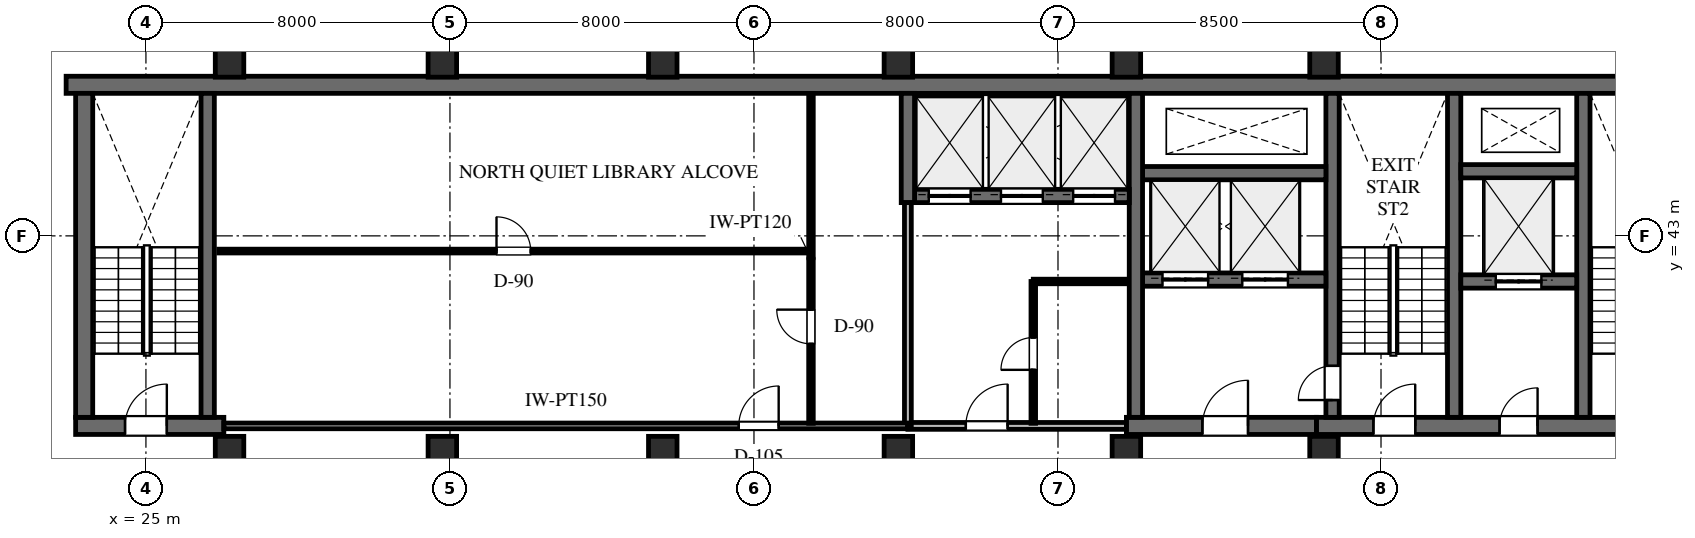
"""IFC4 building model, lengths in metres.
Left out: names, types, materials, properties, quantities, classifications, styles, units other than length and angle.
Written with IfcOpenShell. Run it as: python <this file> out.ifc"""

import sys

from ifc_helpers import new_model, si_unit, direction, frame, frame_2d, origin, origin_2d, place, context, subcontext, project, spatial, rectangle, extrude, element, fill, save


model = new_model("IFC4")
c1 = context("Model", 3, precision=1e-05, world=origin(), true_north=direction((0.0, 1.0)))
c2 = subcontext(c1, "Body", "Model", "MODEL_VIEW")
j1 = project(units=[si_unit("LENGTHUNIT", "METRE"), si_unit("PLANEANGLEUNIT", "RADIAN")], contexts=[c1])
p1 = place(None, origin())
s1 = spatial("IfcSite", under=j1, at=p1, CompositionType="ELEMENT")
p2 = place(p1, origin())
s2 = spatial("IfcBuilding", under=s1, at=p2, CompositionType="ELEMENT")
p3 = place(p2, frame((0.0, 0.0, 234.6)))
s3 = spatial("IfcBuildingStorey", under=s2, at=p3, CompositionType="ELEMENT", Elevation=234.6)
p4 = place(p3, frame((22.9, 46.975, 0.0), z_axis=(0.0, 0.0, 1.0), x_axis=(1.0, 0.0, 0.0)))
e1 = element("IfcWall", 1, at=p4, inside=s3, PredefinedType="SHEAR", context=c2, shape_type="SweptSolid", body=[
    extrude(rectangle(XDim=43.4, YDim=0.45, at=frame_2d((21.7, 0.0))), origin(), (0.0, 0.0, 1.0), 3.6),
])
p5 = place(p3, frame((55.8, 38.0, 0.0), z_axis=(0.0, 0.0, 1.0), x_axis=(1.0, 0.0, 0.0)))
e2 = element("IfcWall", 2, at=p5, inside=s3, PredefinedType="SHEAR", context=c2, shape_type="SweptSolid", body=[
    extrude(rectangle(XDim=10.5, YDim=0.45, at=frame_2d((5.25, 0.0))), origin(), (0.0, 0.0, 1.0), 3.6),
])
p6 = place(p5, frame((1.5, 0.0, 0.0)))
e3 = element("IfcOpeningElement", 3, at=p6, cuts=e2, PredefinedType="OPENING", context=c2, shape_type="SweptSolid", body=[
    extrude(rectangle(XDim=1.1, YDim=2.2, at=frame_2d((0.55, 1.1))), frame((0.0, 0.235, 0.0), z_axis=(0.0, -1.0, 0.0), x_axis=(1.0, 0.0, 0.0)), (0.0, 0.0, 1.0), 0.47),
])
p7 = place(p5, frame((4.82, 0.0, 0.0)))
e4 = element("IfcOpeningElement", 4, at=p7, cuts=e2, PredefinedType="OPENING", context=c2, shape_type="SweptSolid", body=[
    extrude(rectangle(XDim=1.0, YDim=2.15, at=frame_2d((0.5, 1.075))), frame((0.0, 0.235, 0.0), z_axis=(0.0, -1.0, 0.0), x_axis=(1.0, 0.0, 0.0)), (0.0, 0.0, 1.0), 0.47),
])
p8 = place(p5, frame((8.05, 0.0, 0.0)))
e5 = element("IfcOpeningElement", 5, at=p8, cuts=e2, PredefinedType="OPENING", context=c2, shape_type="SweptSolid", body=[
    extrude(rectangle(XDim=1.1, YDim=2.2, at=frame_2d((0.55, 1.1))), frame((0.0, 0.235, 0.0), z_axis=(0.0, -1.0, 0.0), x_axis=(1.0, 0.0, 0.0)), (0.0, 0.0, 1.0), 0.47),
])
for number, where, z_axis, x_axis in (
    (6, (62.825, 38.225, 0.0), (0.0, 0.0, 1.0), (0.0, 1.0, 0.0)),
    (7, (59.425, 38.225, 0.0), (0.0, 0.0, 1.0), (0.0, 1.0, 0.0)),
):
    element("IfcWall", number, at=place(p3, frame(where, z_axis=z_axis, x_axis=x_axis)), inside=s3, PredefinedType="SHEAR", context=c2, shape_type="SweptSolid", body=[
        extrude(rectangle(XDim=8.525, YDim=0.35, at=frame_2d((4.262, 0.0))), origin(), (0.0, 0.0, 1.0), 3.6),
    ])
p9 = place(p3, frame((56.225, 38.225, 0.0), z_axis=(0.0, 0.0, 1.0), x_axis=(0.0, 1.0, 0.0)))
e8 = element("IfcWall", 8, at=p9, inside=s3, PredefinedType="SHEAR", context=c2, shape_type="SweptSolid", body=[
    extrude(rectangle(XDim=8.525, YDim=0.35, at=frame_2d((4.262, 0.0))), origin(), (0.0, 0.0, 1.0), 3.6),
])
p10 = place(p9, frame((0.455, 0.0, 0.0)))
e9 = element("IfcOpeningElement", 9, at=p10, cuts=e8, PredefinedType="OPENING", context=c2, shape_type="SweptSolid", body=[
    extrude(rectangle(XDim=0.9, YDim=2.15, at=frame_2d((0.45, 1.075))), frame((0.0, 0.185, 0.0), z_axis=(0.0, -1.0, 0.0), x_axis=(1.0, 0.0, 0.0)), (0.0, 0.0, 1.0), 0.37),
])
p11 = place(p3, frame((59.6, 41.8, 0.0), z_axis=(0.0, 0.0, 1.0), x_axis=(1.0, 0.0, 0.0)))
e10 = element("IfcWall", 10, at=p11, inside=s3, PredefinedType="SHEAR", context=c2, shape_type="SweptSolid", body=[
    extrude(rectangle(XDim=3.05, YDim=0.35, at=frame_2d((1.525, 0.0))), origin(), (0.0, 0.0, 1.0), 3.6),
])
p12 = place(p11, frame((0.92, 0.0, 0.0)))
e11 = element("IfcOpeningElement", 11, at=p12, cuts=e10, PredefinedType="OPENING", context=c2, shape_type="SweptSolid", body=[
    extrude(rectangle(XDim=1.2, YDim=2.2, at=frame_2d((0.6, 1.1))), frame((0.0, 0.185, 0.0), z_axis=(0.0, -1.0, 0.0), x_axis=(1.0, 0.0, 0.0)), (0.0, 0.0, 1.0), 0.37),
])
p13 = place(p3, frame((59.6, 44.7, 0.0), z_axis=(0.0, 0.0, 1.0), x_axis=(1.0, 0.0, 0.0)))
e12 = element("IfcWall", 12, at=p13, inside=s3, PredefinedType="SHEAR", context=c2, shape_type="SweptSolid", body=[
    extrude(rectangle(XDim=3.05, YDim=0.35, at=frame_2d((1.525, 0.0))), origin(), (0.0, 0.0, 1.0), 3.6),
])
p14 = place(p3, frame((50.8, 38.0, 0.0), z_axis=(0.0, 0.0, 1.0), x_axis=(1.0, 0.0, 0.0)))
e13 = element("IfcWall", 13, at=p14, inside=s3, PredefinedType="SHEAR", context=c2, shape_type="SweptSolid", body=[
    extrude(rectangle(XDim=5.0, YDim=0.45, at=frame_2d((2.5, 0.0))), origin(), (0.0, 0.0, 1.0), 3.6),
])
p15 = place(p14, frame((2.0, 0.0, 0.0)))
e14 = element("IfcOpeningElement", 14, at=p15, cuts=e13, PredefinedType="OPENING", context=c2, shape_type="SweptSolid", body=[
    extrude(rectangle(XDim=1.2, YDim=2.2, at=frame_2d((0.6, 1.1))), frame((0.0, 0.235, 0.0), z_axis=(0.0, -1.0, 0.0), x_axis=(1.0, 0.0, 0.0)), (0.0, 0.0, 1.0), 0.47),
])
p16 = place(p3, frame((51.225, 41.85, 0.0), z_axis=(0.0, 0.0, 1.0), x_axis=(1.0, 0.0, 0.0)))
e15 = element("IfcWall", 15, at=p16, inside=s3, PredefinedType="SHEAR", context=c2, shape_type="SweptSolid", body=[
    extrude(rectangle(XDim=4.825, YDim=0.35, at=frame_2d((2.413, 0.0))), origin(), (0.0, 0.0, 1.0), 3.6),
])
p17 = place(p16, frame((0.525, 0.0, 0.0)))
e16 = element("IfcOpeningElement", 16, at=p17, cuts=e15, PredefinedType="OPENING", context=c2, shape_type="SweptSolid", body=[
    extrude(rectangle(XDim=1.2, YDim=2.2, at=frame_2d((0.6, 1.1))), frame((0.0, 0.185, 0.0), z_axis=(0.0, -1.0, 0.0), x_axis=(1.0, 0.0, 0.0)), (0.0, 0.0, 1.0), 0.37),
])
p18 = place(p16, frame((2.625, 0.0, 0.0)))
e17 = element("IfcOpeningElement", 17, at=p18, cuts=e15, PredefinedType="OPENING", context=c2, shape_type="SweptSolid", body=[
    extrude(rectangle(XDim=1.2, YDim=2.2, at=frame_2d((0.6, 1.1))), frame((0.0, 0.185, 0.0), z_axis=(0.0, -1.0, 0.0), x_axis=(1.0, 0.0, 0.0)), (0.0, 0.0, 1.0), 0.37),
])
p19 = place(p3, frame((51.225, 44.65, 0.0), z_axis=(0.0, 0.0, 1.0), x_axis=(1.0, 0.0, 0.0)))
e18 = element("IfcWall", 18, at=p19, inside=s3, PredefinedType="SHEAR", context=c2, shape_type="SweptSolid", body=[
    extrude(rectangle(XDim=4.825, YDim=0.35, at=frame_2d((2.413, 0.0))), origin(), (0.0, 0.0, 1.0), 3.6),
])
p20 = place(p3, frame((51.05, 38.225, 0.0), z_axis=(0.0, 0.0, 1.0), x_axis=(0.0, 1.0, 0.0)))
e19 = element("IfcWall", 19, at=p20, inside=s3, PredefinedType="SHEAR", context=c2, shape_type="SweptSolid", body=[
    extrude(rectangle(XDim=8.525, YDim=0.35, at=frame_2d((4.262, 0.0))), origin(), (0.0, 0.0, 1.0), 3.6),
])
p21 = place(p3, frame((45.225, 44.05, 0.0), z_axis=(0.0, 0.0, 1.0), x_axis=(1.0, 0.0, 0.0)))
e20 = element("IfcWall", 20, at=p21, inside=s3, PredefinedType="SHEAR", context=c2, shape_type="SweptSolid", body=[
    extrude(rectangle(XDim=5.65, YDim=0.35, at=frame_2d((2.825, 0.0))), origin(), (0.0, 0.0, 1.0), 3.6),
])
p22 = place(p21, frame((0.375, 0.0, 0.0)))
e21 = element("IfcOpeningElement", 21, at=p22, cuts=e20, PredefinedType="OPENING", context=c2, shape_type="SweptSolid", body=[
    extrude(rectangle(XDim=1.1, YDim=2.2, at=frame_2d((0.55, 1.1))), frame((0.0, 0.185, 0.0), z_axis=(0.0, -1.0, 0.0), x_axis=(1.0, 0.0, 0.0)), (0.0, 0.0, 1.0), 0.37),
])
p23 = place(p21, frame((2.275, 0.0, 0.0)))
e22 = element("IfcOpeningElement", 22, at=p23, cuts=e20, PredefinedType="OPENING", context=c2, shape_type="SweptSolid", body=[
    extrude(rectangle(XDim=1.1, YDim=2.2, at=frame_2d((0.55, 1.1))), frame((0.0, 0.185, 0.0), z_axis=(0.0, -1.0, 0.0), x_axis=(1.0, 0.0, 0.0)), (0.0, 0.0, 1.0), 0.37),
])
p24 = place(p21, frame((4.175, 0.0, 0.0)))
e23 = element("IfcOpeningElement", 23, at=p24, cuts=e20, PredefinedType="OPENING", context=c2, shape_type="SweptSolid", body=[
    extrude(rectangle(XDim=1.1, YDim=2.2, at=frame_2d((0.55, 1.1))), frame((0.0, 0.185, 0.0), z_axis=(0.0, -1.0, 0.0), x_axis=(1.0, 0.0, 0.0)), (0.0, 0.0, 1.0), 0.37),
])
p25 = place(p3, frame((45.05, 43.875, 0.0), z_axis=(0.0, 0.0, 1.0), x_axis=(0.0, 1.0, 0.0)))
e24 = element("IfcWall", 24, at=p25, inside=s3, PredefinedType="SHEAR", context=c2, shape_type="SweptSolid", body=[
    extrude(rectangle(XDim=2.875, YDim=0.35, at=frame_2d((1.438, 0.0))), origin(), (0.0, 0.0, 1.0), 3.6),
])
p26 = place(p3, frame((23.15, 38.0, 0.0), z_axis=(0.0, 0.0, 1.0), x_axis=(1.0, 0.0, 0.0)))
e25 = element("IfcWall", 25, at=p26, inside=s3, PredefinedType="SHEAR", context=c2, shape_type="SweptSolid", body=[
    extrude(rectangle(XDim=3.9, YDim=0.45, at=frame_2d((1.95, 0.0))), origin(), (0.0, 0.0, 1.0), 3.6),
])
p27 = place(p26, frame((1.3, 0.0, 0.0)))
e26 = element("IfcOpeningElement", 26, at=p27, cuts=e25, PredefinedType="OPENING", context=c2, shape_type="SweptSolid", body=[
    extrude(rectangle(XDim=1.1, YDim=2.2, at=frame_2d((0.55, 1.1))), frame((0.0, 0.235, 0.0), z_axis=(0.0, -1.0, 0.0), x_axis=(1.0, 0.0, 0.0)), (0.0, 0.0, 1.0), 0.47),
])
p28 = place(p3, frame((23.375, 38.225, 0.0), z_axis=(0.0, 0.0, 1.0), x_axis=(0.0, 1.0, 0.0)))
e27 = element("IfcWall", 27, at=p28, inside=s3, PredefinedType="SHEAR", context=c2, shape_type="SweptSolid", body=[
    extrude(rectangle(XDim=8.525, YDim=0.45, at=frame_2d((4.262, 0.0))), origin(), (0.0, 0.0, 1.0), 3.6),
])
p29 = place(p3, frame((26.625, 38.225, 0.0), z_axis=(0.0, 0.0, 1.0), x_axis=(0.0, 1.0, 0.0)))
e28 = element("IfcWall", 28, at=p29, inside=s3, PredefinedType="SHEAR", context=c2, shape_type="SweptSolid", body=[
    extrude(rectangle(XDim=8.525, YDim=0.35, at=frame_2d((4.262, 0.0))), origin(), (0.0, 0.0, 1.0), 3.6),
])
for number, where, z_axis, x_axis in (
    (29, (56.0, 47.55, 0.0), (0.0, 0.0, 1.0), (1.0, 0.0, 0.0)),
    (30, (56.0, 37.35, 0.0), (0.0, 0.0, 1.0), (1.0, 0.0, 0.0)),
    (31, (50.8, 47.55, 0.0), (0.0, 0.0, 1.0), (1.0, 0.0, 0.0)),
    (32, (50.8, 37.35, 0.0), (0.0, 0.0, 1.0), (1.0, 0.0, 0.0)),
    (33, (44.8, 37.35, 0.0), (0.0, 0.0, 1.0), (1.0, 0.0, 0.0)),
    (34, (44.8, 47.55, 0.0), (0.0, 0.0, 1.0), (1.0, 0.0, 0.0)),
    (35, (38.6, 37.35, 0.0), (0.0, 0.0, 1.0), (1.0, 0.0, 0.0)),
    (36, (38.6, 47.55, 0.0), (0.0, 0.0, 1.0), (1.0, 0.0, 0.0)),
    (37, (32.8, 37.35, 0.0), (0.0, 0.0, 1.0), (1.0, 0.0, 0.0)),
    (38, (32.8, 47.55, 0.0), (0.0, 0.0, 1.0), (1.0, 0.0, 0.0)),
    (39, (27.2, 37.35, 0.0), (0.0, 0.0, 1.0), (1.0, 0.0, 0.0)),
    (40, (27.2, 47.55, 0.0), (0.0, 0.0, 1.0), (1.0, 0.0, 0.0)),
):
    element("IfcColumn", number, at=place(p3, frame(where, z_axis=z_axis, x_axis=x_axis)), inside=s3, PredefinedType="COLUMN", context=c2, shape_type="SweptSolid", body=[
        extrude(rectangle(XDim=0.75, YDim=0.75, at=origin_2d()), origin(), (0.0, 0.0, 1.0), 3.6),
    ])
p30 = place(p3, frame((45.05, 38.0, 0.0), z_axis=(0.0, 0.0, 1.0), x_axis=(1.0, 0.0, 0.0)))
e41 = element("IfcWall", 41, at=p30, inside=s3, PredefinedType="STANDARD", context=c2, shape_type="SweptSolid", body=[
    extrude(rectangle(XDim=5.75, YDim=0.18, at=frame_2d((2.875, 0.0))), origin(), (0.0, 0.0, 1.0), 2.664),
])
p31 = place(p30, frame((1.525, 0.0, 0.0)))
e42 = element("IfcOpeningElement", 42, at=p31, cuts=e41, PredefinedType="OPENING", context=c2, shape_type="SweptSolid", body=[
    extrude(rectangle(XDim=1.1, YDim=2.2, at=frame_2d((0.55, 1.1))), frame((0.0, 0.1, 0.0), z_axis=(0.0, -1.0, 0.0), x_axis=(1.0, 0.0, 0.0)), (0.0, 0.0, 1.0), 0.2),
])
p32 = place(p3, frame((48.35, 38.068, 0.0), z_axis=(0.0, 0.0, 1.0), x_axis=(0.0, 1.0, 0.0)))
e43 = element("IfcWall", 43, at=p32, inside=s3, PredefinedType="PARTITIONING", context=c2, shape_type="SweptSolid", body=[
    extrude(rectangle(XDim=3.732, YDim=0.12, at=frame_2d((1.866, 0.0))), origin(), (0.0, 0.0, 1.0), 3.36),
])
p33 = place(p32, frame((1.407, 0.0, 0.0)))
e44 = element("IfcOpeningElement", 44, at=p33, cuts=e43, PredefinedType="OPENING", context=c2, shape_type="SweptSolid", body=[
    extrude(rectangle(XDim=0.85, YDim=2.1, at=frame_2d((0.425, 1.05))), frame((0.0, 0.07, 0.0), z_axis=(0.0, -1.0, 0.0), x_axis=(1.0, 0.0, 0.0)), (0.0, 0.0, 1.0), 0.14),
])
p34 = place(p3, frame((48.35, 41.8, 0.0), z_axis=(0.0, 0.0, 1.0), x_axis=(1.0, 0.0, 0.0)))
e45 = element("IfcWall", 45, at=p34, inside=s3, PredefinedType="PARTITIONING", context=c2, shape_type="SweptSolid", body=[
    extrude(rectangle(XDim=2.5, YDim=0.12, at=frame_2d((1.25, 0.0))), origin(), (0.0, 0.0, 1.0), 2.664),
])
p35 = place(p3, frame((45.05, 38.0, 0.0), z_axis=(0.0, 0.0, 1.0), x_axis=(0.0, 1.0, 0.0)))
e46 = element("IfcWall", 46, at=p35, inside=s3, PredefinedType="STANDARD", context=c2, shape_type="SweptSolid", body=[
    extrude(rectangle(XDim=5.875, YDim=0.18, at=frame_2d((2.938, 0.0))), origin(), (0.0, 0.0, 1.0), 2.664),
])
p36 = place(p3, frame((27.05, 38.0, 0.0), z_axis=(0.0, 0.0, 1.0), x_axis=(1.0, 0.0, 0.0)))
e47 = element("IfcWall", 47, at=p36, inside=s3, PredefinedType="PARTITIONING", context=c2, shape_type="SweptSolid", body=[
    extrude(rectangle(XDim=18.0, YDim=0.15, at=frame_2d((9.0, 0.0))), origin(), (0.0, 0.0, 1.0), 2.664),
])
p37 = place(p36, frame((13.55, 0.0, 0.0)))
e48 = element("IfcOpeningElement", 48, at=p37, cuts=e47, PredefinedType="OPENING", context=c2, shape_type="SweptSolid", body=[
    extrude(rectangle(XDim=1.05, YDim=2.2, at=frame_2d((0.525, 1.1))), frame((0.0, 0.085, 0.0), z_axis=(0.0, -1.0, 0.0), x_axis=(1.0, 0.0, 0.0)), (0.0, 0.0, 1.0), 0.17),
])
p38 = place(p3, frame((42.5, 38.068, 0.0), z_axis=(0.0, 0.0, 1.0), x_axis=(0.0, 1.0, 0.0)))
e49 = element("IfcWall", 49, at=p38, inside=s3, PredefinedType="PARTITIONING", context=c2, shape_type="SweptSolid", body=[
    extrude(rectangle(XDim=8.674, YDim=0.12, at=frame_2d((4.337, 0.0))), origin(), (0.0, 0.0, 1.0), 3.36),
])
p39 = place(p38, frame((2.091, 0.0, 0.0)))
e50 = element("IfcOpeningElement", 50, at=p39, cuts=e49, PredefinedType="OPENING", context=c2, shape_type="SweptSolid", body=[
    extrude(rectangle(XDim=0.9, YDim=2.1, at=frame_2d((0.45, 1.05))), frame((0.0, 0.07, 0.0), z_axis=(0.0, -1.0, 0.0), x_axis=(1.0, 0.0, 0.0)), (0.0, 0.0, 1.0), 0.14),
])
p40 = place(p3, frame((26.918, 42.6, 0.0), z_axis=(0.0, 0.0, 1.0), x_axis=(1.0, 0.0, 0.0)))
e51 = element("IfcWall", 51, at=p40, inside=s3, PredefinedType="PARTITIONING", context=c2, shape_type="SweptSolid", body=[
    extrude(rectangle(XDim=15.514, YDim=0.1, at=frame_2d((7.757, 0.0))), origin(), (0.0, 0.0, 1.0), 2.664),
])
p41 = place(p40, frame((7.307, 0.0, 0.0)))
e52 = element("IfcOpeningElement", 52, at=p41, cuts=e51, PredefinedType="OPENING", context=c2, shape_type="SweptSolid", body=[
    extrude(rectangle(XDim=0.9, YDim=2.1, at=frame_2d((0.45, 1.05))), frame((0.0, 0.06, 0.0), z_axis=(0.0, -1.0, 0.0), x_axis=(1.0, 0.0, 0.0)), (0.0, 0.0, 1.0), 0.12),
])
p42 = place(p6, origin())
e53 = element("IfcDoor", 53, at=p42, inside=s3, OperationType="SINGLE_SWING_RIGHT", PredefinedType="DOOR", context=c2, shape_type="SweptSolid", body=[
    extrude(rectangle(XDim=1.1, YDim=2.2, at=frame_2d((0.55, 1.1))), frame((0.0, 0.025, 0.0), z_axis=(0.0, -1.0, 0.0), x_axis=(1.0, 0.0, 0.0)), (0.0, 0.0, 1.0), 0.05),
])
fill(e3, e53)
p43 = place(p7, origin())
e54 = element("IfcDoor", 54, at=p43, inside=s3, OperationType="SINGLE_SWING_RIGHT", PredefinedType="DOOR", context=c2, shape_type="SweptSolid", body=[
    extrude(rectangle(XDim=1.0, YDim=2.15, at=frame_2d((0.5, 1.075))), frame((0.0, 0.025, 0.0), z_axis=(0.0, -1.0, 0.0), x_axis=(1.0, 0.0, 0.0)), (0.0, 0.0, 1.0), 0.05),
])
fill(e4, e54)
p44 = place(p15, origin())
e55 = element("IfcDoor", 55, at=p44, inside=s3, OperationType="SINGLE_SWING_RIGHT", PredefinedType="DOOR", context=c2, shape_type="SweptSolid", body=[
    extrude(rectangle(XDim=1.2, YDim=2.2, at=frame_2d((0.6, 1.1))), frame((0.0, 0.025, 0.0), z_axis=(0.0, -1.0, 0.0), x_axis=(1.0, 0.0, 0.0)), (0.0, 0.0, 1.0), 0.05),
])
fill(e14, e55)
p45 = place(p10, origin())
e56 = element("IfcDoor", 56, at=p45, inside=s3, OperationType="SINGLE_SWING_LEFT", PredefinedType="DOOR", context=c2, shape_type="SweptSolid", body=[
    extrude(rectangle(XDim=0.9, YDim=2.15, at=frame_2d((0.45, 1.075))), frame((0.0, 0.025, 0.0), z_axis=(0.0, -1.0, 0.0), x_axis=(1.0, 0.0, 0.0)), (0.0, 0.0, 1.0), 0.05),
])
fill(e9, e56)
p46 = place(p27, origin())
e57 = element("IfcDoor", 57, at=p46, inside=s3, OperationType="SINGLE_SWING_RIGHT", PredefinedType="DOOR", context=c2, shape_type="SweptSolid", body=[
    extrude(rectangle(XDim=1.1, YDim=2.2, at=frame_2d((0.55, 1.1))), frame((0.0, 0.025, 0.0), z_axis=(0.0, -1.0, 0.0), x_axis=(1.0, 0.0, 0.0)), (0.0, 0.0, 1.0), 0.05),
])
fill(e26, e57)
p47 = place(p22, origin())
e58 = element("IfcDoor", 58, at=p47, inside=s3, OperationType="DOUBLE_DOOR_SLIDING", PredefinedType="DOOR", context=c2, shape_type="SweptSolid", body=[
    extrude(rectangle(XDim=1.1, YDim=2.2, at=frame_2d((0.55, 1.1))), frame((0.0, 0.025, 0.0), z_axis=(0.0, -1.0, 0.0), x_axis=(1.0, 0.0, 0.0)), (0.0, 0.0, 1.0), 0.05),
])
fill(e21, e58)
p48 = place(p23, origin())
e59 = element("IfcDoor", 59, at=p48, inside=s3, OperationType="DOUBLE_DOOR_SLIDING", PredefinedType="DOOR", context=c2, shape_type="SweptSolid", body=[
    extrude(rectangle(XDim=1.1, YDim=2.2, at=frame_2d((0.55, 1.1))), frame((0.0, 0.025, 0.0), z_axis=(0.0, -1.0, 0.0), x_axis=(1.0, 0.0, 0.0)), (0.0, 0.0, 1.0), 0.05),
])
fill(e22, e59)
p49 = place(p24, origin())
e60 = element("IfcDoor", 60, at=p49, inside=s3, OperationType="DOUBLE_DOOR_SLIDING", PredefinedType="DOOR", context=c2, shape_type="SweptSolid", body=[
    extrude(rectangle(XDim=1.1, YDim=2.2, at=frame_2d((0.55, 1.1))), frame((0.0, 0.025, 0.0), z_axis=(0.0, -1.0, 0.0), x_axis=(1.0, 0.0, 0.0)), (0.0, 0.0, 1.0), 0.05),
])
fill(e23, e60)
p50 = place(p17, origin())
e61 = element("IfcDoor", 61, at=p50, inside=s3, OperationType="DOUBLE_DOOR_SLIDING", PredefinedType="DOOR", context=c2, shape_type="SweptSolid", body=[
    extrude(rectangle(XDim=1.2, YDim=2.2, at=frame_2d((0.6, 1.1))), frame((0.0, 0.025, 0.0), z_axis=(0.0, -1.0, 0.0), x_axis=(1.0, 0.0, 0.0)), (0.0, 0.0, 1.0), 0.05),
])
fill(e16, e61)
p51 = place(p18, origin())
e62 = element("IfcDoor", 62, at=p51, inside=s3, OperationType="DOUBLE_DOOR_SLIDING", PredefinedType="DOOR", context=c2, shape_type="SweptSolid", body=[
    extrude(rectangle(XDim=1.2, YDim=2.2, at=frame_2d((0.6, 1.1))), frame((0.0, 0.025, 0.0), z_axis=(0.0, -1.0, 0.0), x_axis=(1.0, 0.0, 0.0)), (0.0, 0.0, 1.0), 0.05),
])
fill(e17, e62)
p52 = place(p12, origin())
e63 = element("IfcDoor", 63, at=p52, inside=s3, OperationType="DOUBLE_DOOR_SLIDING", PredefinedType="DOOR", context=c2, shape_type="SweptSolid", body=[
    extrude(rectangle(XDim=1.2, YDim=2.2, at=frame_2d((0.6, 1.1))), frame((0.0, 0.025, 0.0), z_axis=(0.0, -1.0, 0.0), x_axis=(1.0, 0.0, 0.0)), (0.0, 0.0, 1.0), 0.05),
])
fill(e11, e63)
p53 = place(p31, origin())
e64 = element("IfcDoor", 64, at=p53, inside=s3, OperationType="SINGLE_SWING_RIGHT", PredefinedType="DOOR", context=c2, shape_type="SweptSolid", body=[
    extrude(rectangle(XDim=1.1, YDim=2.2, at=frame_2d((0.55, 1.1))), frame((0.0, 0.025, 0.0), z_axis=(0.0, -1.0, 0.0), x_axis=(1.0, 0.0, 0.0)), (0.0, 0.0, 1.0), 0.05),
])
fill(e42, e64)
p54 = place(p33, origin())
e65 = element("IfcDoor", 65, at=p54, inside=s3, OperationType="SINGLE_SWING_LEFT", PredefinedType="DOOR", context=c2, shape_type="SweptSolid", body=[
    extrude(rectangle(XDim=0.85, YDim=2.1, at=frame_2d((0.425, 1.05))), frame((0.0, 0.025, 0.0), z_axis=(0.0, -1.0, 0.0), x_axis=(1.0, 0.0, 0.0)), (0.0, 0.0, 1.0), 0.05),
])
fill(e44, e65)
p55 = place(p37, origin())
e66 = element("IfcDoor", 66, at=p55, inside=s3, OperationType="SINGLE_SWING_RIGHT", PredefinedType="DOOR", context=c2, shape_type="SweptSolid", body=[
    extrude(rectangle(XDim=1.05, YDim=2.2, at=frame_2d((0.525, 1.1))), frame((0.0, 0.025, 0.0), z_axis=(0.0, -1.0, 0.0), x_axis=(1.0, 0.0, 0.0)), (0.0, 0.0, 1.0), 0.05),
])
fill(e48, e66)
p56 = place(p41, origin())
e67 = element("IfcDoor", 67, at=p56, inside=s3, OperationType="SINGLE_SWING_LEFT", PredefinedType="DOOR", context=c2, shape_type="SweptSolid", body=[
    extrude(rectangle(XDim=0.9, YDim=2.1, at=frame_2d((0.45, 1.05))), frame((0.0, 0.025, 0.0), z_axis=(0.0, -1.0, 0.0), x_axis=(1.0, 0.0, 0.0)), (0.0, 0.0, 1.0), 0.05),
])
fill(e52, e67)
p57 = place(p39, origin())
e68 = element("IfcDoor", 68, at=p57, inside=s3, OperationType="SINGLE_SWING_RIGHT", PredefinedType="DOOR", context=c2, shape_type="SweptSolid", body=[
    extrude(rectangle(XDim=0.9, YDim=2.1, at=frame_2d((0.45, 1.05))), frame((0.0, 0.025, 0.0), z_axis=(0.0, -1.0, 0.0), x_axis=(1.0, 0.0, 0.0)), (0.0, 0.0, 1.0), 0.05),
])
fill(e50, e68)
save(model, sys.argv[1])
